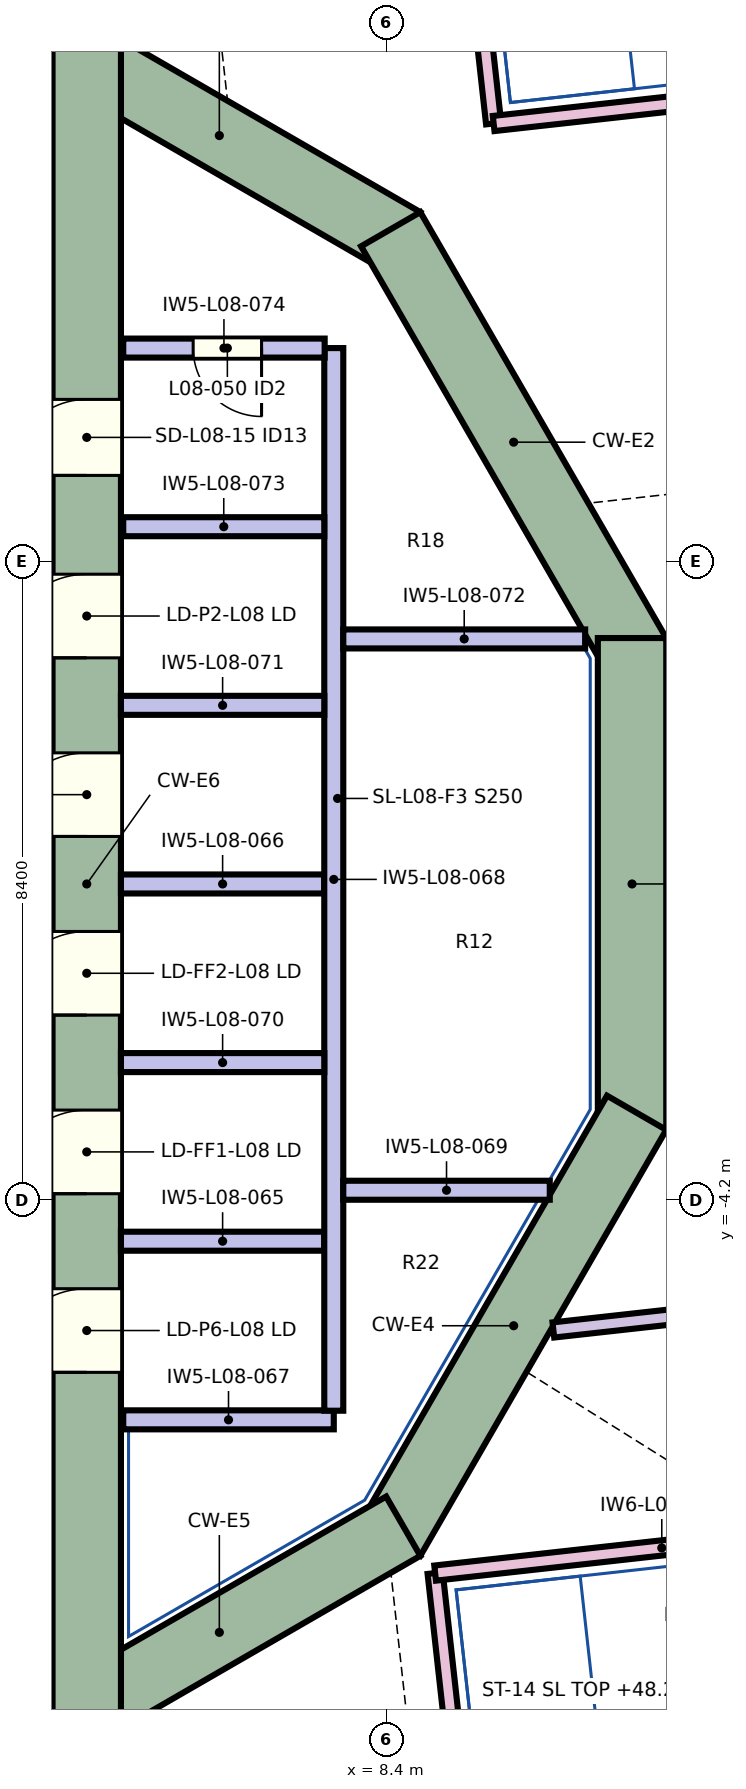
"""IFC4 building model, lengths in metres.
Left out: names, types, materials, properties, quantities, classifications, styles, units other than length and angle.
Written with IfcOpenShell. Run it as: python <this file> out.ifc"""

import sys

from ifc_helpers import new_model, si_unit, direction, frame, frame_2d, origin, place, context, subcontext, project, spatial, rectangle, extrude, element, fill, save


model = new_model("IFC4")
c1 = context("Model", 3, precision=1e-05, world=origin(), true_north=direction((0.0, 1.0)))
c2 = subcontext(c1, "Body", "Model", "MODEL_VIEW")
j1 = project(units=[si_unit("LENGTHUNIT", "METRE"), si_unit("PLANEANGLEUNIT", "RADIAN")], contexts=[c1])
p1 = place(None, origin())
s1 = spatial("IfcSite", under=j1, at=p1, CompositionType="ELEMENT")
p2 = place(p1, origin())
s2 = spatial("IfcBuilding", under=s1, at=p2, CompositionType="ELEMENT")
p3 = place(p2, frame((0.0, 0.0, 46.3)))
s3 = spatial("IfcBuildingStorey", under=s2, at=p3, CompositionType="ELEMENT", Elevation=46.3)
p4 = place(p3, frame((3.775, 11.243, 0.0), z_axis=(0.0, 0.0, 1.0), x_axis=(0.866026961591, -0.49999730179, 0.0)))
e1 = element("IfcWall", 1, at=p4, inside=s3, PredefinedType="SHEAR", context=c2, shape_type="SweptSolid", body=[
    extrude(rectangle(XDim=5.587, YDim=0.9, at=frame_2d((2.794, 0.0))), origin(), (0.0, 0.0, 1.0), 3.8),
])
p5 = place(p3, frame((8.449, 8.614, 0.0), z_axis=(0.0, 0.0, 1.0), x_axis=(0.499990282633, -0.866031014036, 0.0)))
e2 = element("IfcWall", 2, at=p5, inside=s3, PredefinedType="SHEAR", context=c2, shape_type="SweptSolid", body=[
    extrude(rectangle(XDim=6.47, YDim=0.9, at=frame_2d((3.235, 0.0))), origin(), (0.0, 0.0, 1.0), 3.8),
])
p6 = place(p3, frame((11.624, 3.235, 0.0), z_axis=(0.0, 0.0, 1.0), x_axis=(0.0, -1.0, 0.0)))
e3 = element("IfcWall", 3, at=p6, inside=s3, PredefinedType="SHEAR", context=c2, shape_type="SweptSolid", body=[
    extrude(rectangle(XDim=6.471, YDim=0.9, at=frame_2d((3.235, 0.0))), origin(), (0.0, 0.0, 1.0), 3.8),
])
p7 = place(p3, frame((11.684, -3.01, 0.0), z_axis=(0.0, 0.0, 1.0), x_axis=(-0.499990282633, -0.866031014036, 0.0)))
e4 = element("IfcWall", 4, at=p7, inside=s3, PredefinedType="SHEAR", context=c2, shape_type="SweptSolid", body=[
    extrude(rectangle(XDim=6.47, YDim=0.9, at=frame_2d((3.235, 0.0))), origin(), (0.0, 0.0, 1.0), 3.8),
])
p8 = place(p3, frame((8.614, -8.449, 0.0), z_axis=(0.0, 0.0, 1.0), x_axis=(-0.866026961591, -0.49999730179, 0.0)))
e5 = element("IfcWall", 5, at=p8, inside=s3, PredefinedType="SHEAR", context=c2, shape_type="SweptSolid", body=[
    extrude(rectangle(XDim=5.587, YDim=0.9, at=frame_2d((2.794, 0.0))), origin(), (0.0, 0.0, 1.0), 3.8),
])
p9 = place(p3, frame((4.45, -11.633, 0.0), z_axis=(0.0, 0.0, 1.0), x_axis=(0.0, 1.0, 0.0)))
e6 = element("IfcWall", 6, at=p9, inside=s3, PredefinedType="SHEAR", context=c2, shape_type="SweptSolid", body=[
    extrude(rectangle(XDim=23.265, YDim=0.9, at=frame_2d((11.633, 0.0))), origin(), (0.0, 0.0, 1.0), 3.8),
])
p10 = place(p9, frame((7.558, 0.0, 0.0)))
e7 = element("IfcOpeningElement", 7, at=p10, cuts=e6, PredefinedType="OPENING", context=c2, shape_type="SweptSolid", body=[
    extrude(rectangle(XDim=1.1, YDim=2.1, at=frame_2d((0.55, 1.05))), frame((0.0, 0.46, 0.0), z_axis=(0.0, -1.0, 0.0), x_axis=(1.0, 0.0, 0.0)), (0.0, 0.0, 1.0), 0.92),
])
p11 = place(p9, frame((9.907, 0.0, 0.0)))
e8 = element("IfcOpeningElement", 8, at=p11, cuts=e6, PredefinedType="OPENING", context=c2, shape_type="SweptSolid", body=[
    extrude(rectangle(XDim=1.1, YDim=2.1, at=frame_2d((0.55, 1.05))), frame((0.0, 0.46, 0.0), z_axis=(0.0, -1.0, 0.0), x_axis=(1.0, 0.0, 0.0)), (0.0, 0.0, 1.0), 0.92),
])
p12 = place(p9, frame((12.258, 0.0, 0.0)))
e9 = element("IfcOpeningElement", 9, at=p12, cuts=e6, PredefinedType="OPENING", context=c2, shape_type="SweptSolid", body=[
    extrude(rectangle(XDim=1.1, YDim=2.1, at=frame_2d((0.55, 1.05))), frame((0.0, 0.46, 0.0), z_axis=(0.0, -1.0, 0.0), x_axis=(1.0, 0.0, 0.0)), (0.0, 0.0, 1.0), 0.92),
])
p13 = place(p9, frame((14.607, 0.0, 0.0)))
e10 = element("IfcOpeningElement", 10, at=p13, cuts=e6, PredefinedType="OPENING", context=c2, shape_type="SweptSolid", body=[
    extrude(rectangle(XDim=1.1, YDim=2.1, at=frame_2d((0.55, 1.05))), frame((0.0, 0.46, 0.0), z_axis=(0.0, -1.0, 0.0), x_axis=(1.0, 0.0, 0.0)), (0.0, 0.0, 1.0), 0.92),
])
p14 = place(p9, frame((5.208, 0.0, 0.0)))
e11 = element("IfcOpeningElement", 11, at=p14, cuts=e6, PredefinedType="OPENING", context=c2, shape_type="SweptSolid", body=[
    extrude(rectangle(XDim=1.1, YDim=2.1, at=frame_2d((0.55, 1.05))), frame((0.0, 0.46, 0.0), z_axis=(0.0, -1.0, 0.0), x_axis=(1.0, 0.0, 0.0)), (0.0, 0.0, 1.0), 0.92),
])
p15 = place(p9, frame((17.008, 0.0, 0.0)))
e12 = element("IfcOpeningElement", 12, at=p15, cuts=e6, PredefinedType="OPENING", context=c2, shape_type="SweptSolid", body=[
    extrude(rectangle(XDim=1.0, YDim=2.1, at=frame_2d((0.5, 1.05))), frame((0.0, 0.46, 0.0), z_axis=(0.0, -1.0, 0.0), x_axis=(1.0, 0.0, 0.0)), (0.0, 0.0, 1.0), 0.92),
])
for number, where, z_axis, x_axis in (
    (13, (4.9, -4.7, 0.0), (0.0, 0.0, 1.0), (1.0, 0.0, 0.0)),
    (14, (4.9, 0.0, 0.0), (0.0, 0.0, 1.0), (1.0, 0.0, 0.0)),
):
    element("IfcWall", number, at=place(p3, frame(where, z_axis=z_axis, x_axis=x_axis)), inside=s3, PredefinedType="SOLIDWALL", context=c2, shape_type="SweptSolid", body=[
        extrude(rectangle(XDim=2.675, YDim=0.25, at=frame_2d((1.337, 0.0))), origin(), (0.0, 0.0, 1.0), 3.55),
    ])
p16 = place(p3, frame((4.93, -7.05, 0.0), z_axis=(0.0, 0.0, 1.0), x_axis=(1.0, 0.0, 0.0)))
e15 = element("IfcWall", 15, at=p16, inside=s3, PredefinedType="SOLIDWALL", context=c2, shape_type="SweptSolid", body=[
    extrude(rectangle(XDim=2.77, YDim=0.25, at=frame_2d((1.385, 0.0))), origin(), (0.0, 0.0, 1.0), 3.55),
])
p17 = place(p3, frame((7.7, -6.93, 0.0), z_axis=(0.0, 0.0, 1.0), x_axis=(0.0, 1.0, 0.0)))
e16 = element("IfcWall", 16, at=p17, inside=s3, PredefinedType="SOLIDWALL", context=c2, shape_type="SweptSolid", body=[
    extrude(rectangle(XDim=13.98, YDim=0.25, at=frame_2d((6.99, 0.0))), origin(), (0.0, 0.0, 1.0), 3.55),
])
p18 = place(p3, frame((7.825, -4.03, 0.0), z_axis=(0.0, 0.0, 1.0), x_axis=(1.0, 0.0, 0.0)))
e17 = element("IfcWall", 17, at=p18, inside=s3, PredefinedType="SOLIDWALL", context=c2, shape_type="SweptSolid", body=[
    extrude(rectangle(XDim=2.717, YDim=0.25, at=frame_2d((1.358, 0.0))), origin(), (0.0, 0.0, 1.0), 3.55),
])
for number, where, z_axis, x_axis in (
    (18, (7.575, -2.35, 0.0), (0.0, 0.0, 1.0), (-1.0, 0.0, 0.0)),
    (19, (7.575, 2.35, 0.0), (0.0, 0.0, 1.0), (-1.0, 0.0, 0.0)),
):
    element("IfcWall", number, at=place(p3, frame(where, z_axis=z_axis, x_axis=x_axis)), inside=s3, PredefinedType="SOLIDWALL", context=c2, shape_type="SweptSolid", body=[
        extrude(rectangle(XDim=2.675, YDim=0.25, at=frame_2d((1.337, 0.0))), origin(), (0.0, 0.0, 1.0), 3.55),
    ])
p19 = place(p3, frame((7.825, 3.224, 0.0), z_axis=(0.0, 0.0, 1.0), x_axis=(1.0, 0.0, 0.0)))
e20 = element("IfcWall", 20, at=p19, inside=s3, PredefinedType="SOLIDWALL", context=c2, shape_type="SweptSolid", body=[
    extrude(rectangle(XDim=3.182, YDim=0.25, at=frame_2d((1.591, 0.0))), origin(), (0.0, 0.0, 1.0), 3.55),
])
p20 = place(p3, frame((7.575, 4.7, 0.0), z_axis=(0.0, 0.0, 1.0), x_axis=(-1.0, 0.0, 0.0)))
e21 = element("IfcWall", 21, at=p20, inside=s3, PredefinedType="SOLIDWALL", context=c2, shape_type="SweptSolid", body=[
    extrude(rectangle(XDim=2.645, YDim=0.25, at=frame_2d((1.323, 0.0))), origin(), (0.0, 0.0, 1.0), 3.55),
])
p21 = place(p3, frame((7.58, 7.05, 0.0), z_axis=(0.0, 0.0, 1.0), x_axis=(-1.0, 0.0, 0.0)))
e22 = element("IfcWall", 22, at=p21, inside=s3, PredefinedType="SOLIDWALL", context=c2, shape_type="SweptSolid", body=[
    extrude(rectangle(XDim=2.65, YDim=0.25, at=frame_2d((1.325, 0.0))), origin(), (0.0, 0.0, 1.0), 3.55),
])
p22 = place(p21, frame((0.83, 0.0, 0.0)))
e23 = element("IfcOpeningElement", 23, at=p22, cuts=e22, PredefinedType="OPENING", context=c2, shape_type="SweptSolid", body=[
    extrude(rectangle(XDim=0.9, YDim=2.1, at=frame_2d((0.45, 1.05))), frame((0.0, 0.135, 0.0), z_axis=(0.0, -1.0, 0.0), x_axis=(1.0, 0.0, 0.0)), (0.0, 0.0, 1.0), 0.27),
])
p23 = place(p3, frame((9.033, -9.066, 0.0), z_axis=(0.0, 0.0, 1.0), x_axis=(0.11030110325, -0.993898217436, 0.0)))
e24 = element("IfcWall", 24, at=p23, inside=s3, PredefinedType="SOLIDWALL", context=c2, shape_type="SweptSolid", body=[
    extrude(rectangle(XDim=3.493, YDim=0.2, at=frame_2d((1.746, 0.0))), origin(), (0.0, 0.0, 1.0), 3.55),
])
p24 = place(p3, frame((9.434, 13.334, 0.0), z_axis=(0.0, 0.0, 1.0), x_axis=(0.11027153821, -0.993901498067, 0.0)))
e25 = element("IfcWall", 25, at=p24, inside=s3, PredefinedType="SOLIDWALL", context=c2, shape_type="SweptSolid", body=[
    extrude(rectangle(XDim=3.35, YDim=0.2, at=frame_2d((1.675, 0.0))), origin(), (0.0, 0.0, 1.0), 3.55),
])
p25 = place(p3, frame((9.803, 10.004, 0.0), z_axis=(0.0, 0.0, 1.0), x_axis=(0.993897498792, 0.11030757859, 0.0)))
e26 = element("IfcWall", 26, at=p25, inside=s3, PredefinedType="SOLIDWALL", context=c2, shape_type="SweptSolid", body=[
    extrude(rectangle(XDim=6.053, YDim=0.2, at=frame_2d((3.027, 0.0))), origin(), (0.0, 0.0, 1.0), 3.55),
])
p26 = place(p3, frame((14.997, -8.404, 0.0), z_axis=(0.0, 0.0, 1.0), x_axis=(-0.993897125329, -0.110310943534, 0.0)))
e27 = element("IfcWall", 27, at=p26, inside=s3, PredefinedType="SOLIDWALL", context=c2, shape_type="SweptSolid", body=[
    extrude(rectangle(XDim=6.0, YDim=0.2, at=frame_2d((3.0, 0.0))), origin(), (0.0, 0.0, 1.0), 3.55),
])
p27 = place(p3, frame((17.47, -5.104, 0.0), z_axis=(0.0, 0.0, 1.0), x_axis=(-0.993897488751, -0.110307669061, 0.0)))
e28 = element("IfcWall", 28, at=p27, inside=s3, PredefinedType="PARTITIONING", context=c2, shape_type="SweptSolid", body=[
    extrude(rectangle(XDim=6.923, YDim=0.2, at=frame_2d((3.461, 0.0))), origin(), (0.0, 0.0, 1.0), 3.55),
])
p28 = place(p22, origin())
e29 = element("IfcDoor", 29, at=p28, inside=s3, OperationType="NOTDEFINED", PredefinedType="DOOR", context=c2, shape_type="SweptSolid", body=[
    extrude(rectangle(XDim=0.9, YDim=2.1, at=frame_2d((0.45, 1.05))), frame((0.0, 0.025, 0.0), z_axis=(0.0, -1.0, 0.0), x_axis=(1.0, 0.0, 0.0)), (0.0, 0.0, 1.0), 0.05),
])
fill(e23, e29)
p29 = place(p10, origin())
e30 = element("IfcDoor", 30, at=p29, inside=s3, OperationType="SLIDING_TO_LEFT", PredefinedType="DOOR", context=c2, shape_type="SweptSolid", body=[
    extrude(rectangle(XDim=1.1, YDim=2.1, at=frame_2d((0.55, 1.05))), frame((0.0, 0.025, 0.0), z_axis=(0.0, -1.0, 0.0), x_axis=(1.0, 0.0, 0.0)), (0.0, 0.0, 1.0), 0.05),
])
fill(e7, e30)
p30 = place(p11, origin())
e31 = element("IfcDoor", 31, at=p30, inside=s3, OperationType="SLIDING_TO_LEFT", PredefinedType="DOOR", context=c2, shape_type="SweptSolid", body=[
    extrude(rectangle(XDim=1.1, YDim=2.1, at=frame_2d((0.55, 1.05))), frame((0.0, 0.025, 0.0), z_axis=(0.0, -1.0, 0.0), x_axis=(1.0, 0.0, 0.0)), (0.0, 0.0, 1.0), 0.05),
])
fill(e8, e31)
p31 = place(p12, origin())
e32 = element("IfcDoor", 32, at=p31, inside=s3, OperationType="SLIDING_TO_LEFT", PredefinedType="DOOR", context=c2, shape_type="SweptSolid", body=[
    extrude(rectangle(XDim=1.1, YDim=2.1, at=frame_2d((0.55, 1.05))), frame((0.0, 0.025, 0.0), z_axis=(0.0, -1.0, 0.0), x_axis=(1.0, 0.0, 0.0)), (0.0, 0.0, 1.0), 0.05),
])
fill(e9, e32)
p32 = place(p13, origin())
e33 = element("IfcDoor", 33, at=p32, inside=s3, OperationType="SLIDING_TO_LEFT", PredefinedType="DOOR", context=c2, shape_type="SweptSolid", body=[
    extrude(rectangle(XDim=1.1, YDim=2.1, at=frame_2d((0.55, 1.05))), frame((0.0, 0.025, 0.0), z_axis=(0.0, -1.0, 0.0), x_axis=(1.0, 0.0, 0.0)), (0.0, 0.0, 1.0), 0.05),
])
fill(e10, e33)
p33 = place(p14, origin())
e34 = element("IfcDoor", 34, at=p33, inside=s3, OperationType="SLIDING_TO_LEFT", PredefinedType="DOOR", context=c2, shape_type="SweptSolid", body=[
    extrude(rectangle(XDim=1.1, YDim=2.1, at=frame_2d((0.55, 1.05))), frame((0.0, 0.025, 0.0), z_axis=(0.0, -1.0, 0.0), x_axis=(1.0, 0.0, 0.0)), (0.0, 0.0, 1.0), 0.05),
])
fill(e11, e34)
p34 = place(p15, origin())
e35 = element("IfcDoor", 35, at=p34, inside=s3, OperationType="NOTDEFINED", PredefinedType="DOOR", context=c2, shape_type="SweptSolid", body=[
    extrude(rectangle(XDim=1.0, YDim=2.1, at=frame_2d((0.5, 1.05))), frame((0.0, 0.025, 0.0), z_axis=(0.0, -1.0, 0.0), x_axis=(1.0, 0.0, 0.0)), (0.0, 0.0, 1.0), 0.05),
])
fill(e12, e35)
save(model, sys.argv[1])
